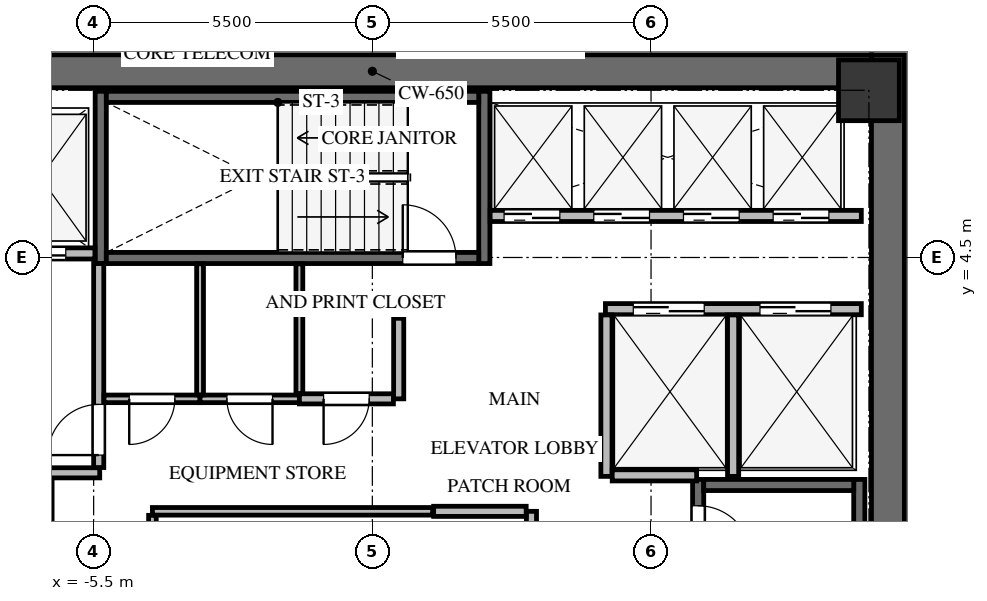
"""IFC4 building model, lengths in metres.
Left out: names, types, materials, properties, quantities, classifications, styles, units other than length and angle.
Written with IfcOpenShell. Run it as: python <this file> out.ifc"""

import sys

from ifc_helpers import new_model, si_unit, direction, frame, frame_2d, origin, origin_2d, place, context, subcontext, project, spatial, rectangle, extrude, source, transform, mapped, element, fill, save


model = new_model("IFC4")
c1 = context("Model", 3, precision=1e-05, world=origin(), true_north=direction((0.0, 1.0)))
c2 = subcontext(c1, "Body", "Model", "MODEL_VIEW")
j1 = project(units=[si_unit("LENGTHUNIT", "METRE"), si_unit("PLANEANGLEUNIT", "RADIAN")], contexts=[c1])
p1 = place(None, origin())
s1 = spatial("IfcSite", under=j1, at=p1, CompositionType="ELEMENT")
p2 = place(p1, origin())
s2 = spatial("IfcBuilding", under=s1, at=p2, CompositionType="ELEMENT")
p3 = place(p2, frame((0.0, 0.0, 177.1)))
s3 = spatial("IfcBuildingStorey", under=s2, at=p3, CompositionType="ELEMENT", Elevation=177.1)
p4 = place(p3, frame((10.175, -8.5, 0.0), z_axis=(0.0, 0.0, 1.0), x_axis=(0.0, 1.0, 0.0)))
e1 = element("IfcWall", 1, at=p4, inside=s3, PredefinedType="SHEAR", context=c2, shape_type="SweptSolid", body=[
    extrude(rectangle(XDim=17.0, YDim=0.65, at=frame_2d((8.5, 0.0))), origin(), (0.0, 0.0, 1.0), 3.3),
])
p5 = place(p3, frame((-9.85, 8.175, 0.0), z_axis=(0.0, 0.0, 1.0), x_axis=(1.0, 0.0, 0.0)))
e2 = element("IfcWall", 2, at=p5, inside=s3, PredefinedType="SHEAR", context=c2, shape_type="SweptSolid", body=[
    extrude(rectangle(XDim=19.7, YDim=0.65, at=frame_2d((9.85, 0.0))), origin(), (0.0, 0.0, 1.0), 3.3),
])
p6 = place(p3, frame((-6.43, -7.77, -0.24), z_axis=(0.0, 0.0, 1.0), x_axis=(0.0, 1.0, 0.0)))
e3 = element("IfcWall", 3, at=p6, inside=s3, PredefinedType="SHEAR", context=c2, shape_type="SweptSolid", body=[
    extrude(rectangle(XDim=7.89, YDim=0.22, at=frame_2d((3.945, 0.0))), origin(), (0.0, 0.0, 1.0), 3.3),
])
p7 = place(p6, frame((6.32, 0.0, 0.0)))
e4 = element("IfcOpeningElement", 4, at=p7, cuts=e3, PredefinedType="OPENING", context=c2, shape_type="SweptSolid", body=[
    extrude(rectangle(XDim=1.05, YDim=2.15, at=frame_2d((0.525, 1.075))), frame((0.0, 0.12, 0.0), z_axis=(0.0, -1.0, 0.0), x_axis=(1.0, 0.0, 0.0)), (0.0, 0.0, 1.0), 0.24),
])
p8 = place(p3, frame((9.61, -7.77, -0.24), z_axis=(0.0, 0.0, 1.0), x_axis=(0.0, 1.0, 0.0)))
e5 = element("IfcWall", 5, at=p8, inside=s3, PredefinedType="SHEAR", context=c2, shape_type="SweptSolid", body=[
    extrude(rectangle(XDim=7.89, YDim=0.22, at=frame_2d((3.945, 0.0))), origin(), (0.0, 0.0, 1.0), 3.3),
])
p9 = place(p3, frame((6.43, 0.12, -0.24), z_axis=(0.0, 0.0, 1.0), x_axis=(0.0, -1.0, 0.0)))
e6 = element("IfcWall", 6, at=p9, inside=s3, PredefinedType="SHEAR", context=c2, shape_type="SweptSolid", body=[
    extrude(rectangle(XDim=7.89, YDim=0.22, at=frame_2d((3.945, 0.0))), origin(), (0.0, 0.0, 1.0), 3.3),
])
p10 = place(p9, frame((0.52, 0.0, 0.0)))
e7 = element("IfcOpeningElement", 7, at=p10, cuts=e6, PredefinedType="OPENING", context=c2, shape_type="SweptSolid", body=[
    extrude(rectangle(XDim=1.05, YDim=2.15, at=frame_2d((0.525, 1.075))), frame((0.0, 0.12, 0.0), z_axis=(0.0, -1.0, 0.0), x_axis=(1.0, 0.0, 0.0)), (0.0, 0.0, 1.0), 0.24),
])
p11 = place(p3, frame((9.5, 0.01, -0.24), z_axis=(0.0, 0.0, 1.0), x_axis=(-1.0, 0.0, 0.0)))
e8 = element("IfcWall", 8, at=p11, inside=s3, PredefinedType="SHEAR", context=c2, shape_type="SweptSolid", body=[
    extrude(rectangle(XDim=2.96, YDim=0.22, at=frame_2d((1.48, 0.0))), origin(), (0.0, 0.0, 1.0), 3.3),
])
for number, where, z_axis, x_axis in (
    (9, (2.21, 4.38, -0.24), (0.0, 0.0, 1.0), (0.0, 1.0, 0.0)),
    (10, (-5.36, 7.78, -0.24), (0.0, 0.0, 1.0), (0.0, -1.0, 0.0)),
):
    element("IfcWall", number, at=place(p3, frame(where, z_axis=z_axis, x_axis=x_axis)), inside=s3, PredefinedType="SHEAR", context=c2, shape_type="SweptSolid", body=[
        extrude(rectangle(XDim=3.4, YDim=0.22, at=frame_2d((1.7, 0.0))), origin(), (0.0, 0.0, 1.0), 3.3),
    ])
p12 = place(p3, frame((-5.25, 4.49, -0.24), z_axis=(0.0, 0.0, 1.0), x_axis=(1.0, 0.0, 0.0)))
e11 = element("IfcWall", 11, at=p12, inside=s3, PredefinedType="SHEAR", context=c2, shape_type="SweptSolid", body=[
    extrude(rectangle(XDim=7.35, YDim=0.22, at=frame_2d((3.675, 0.0))), origin(), (0.0, 0.0, 1.0), 3.3),
])
p13 = place(p12, frame((5.85, 0.0, 0.0)))
e12 = element("IfcOpeningElement", 12, at=p13, cuts=e11, PredefinedType="OPENING", context=c2, shape_type="SweptSolid", body=[
    extrude(rectangle(XDim=1.05, YDim=2.15, at=frame_2d((0.525, 1.075))), frame((0.0, 0.12, 0.0), z_axis=(0.0, -1.0, 0.0), x_axis=(1.0, 0.0, 0.0)), (0.0, 0.0, 1.0), 0.24),
])
p14 = place(p3, frame((2.1, 7.67, -0.24), z_axis=(0.0, 0.0, 1.0), x_axis=(-1.0, 0.0, 0.0)))
e13 = element("IfcWall", 13, at=p14, inside=s3, PredefinedType="SHEAR", context=c2, shape_type="SweptSolid", body=[
    extrude(rectangle(XDim=7.35, YDim=0.22, at=frame_2d((3.675, 0.0))), origin(), (0.0, 0.0, 1.0), 3.3),
])
m1 = source(origin(), c2, "Body", "SweptSolid", [
    extrude(rectangle(XDim=1.2, YDim=1.2, at=origin_2d()), origin(), (0.0, 0.0, 1.0), 3.3),
])
p15 = place(p3, frame((9.8, 7.8, -0.24), z_axis=(0.0, 0.0, 1.0), x_axis=(1.0, 0.0, 0.0)))
e14 = element("IfcColumn", 14, at=p15, inside=s3, PredefinedType="COLUMN", context=c2, shape_type="MappedRepresentation", body=[
    mapped(m1, transform((0.0, 0.0, 0.0), x_axis=(1.0, 0.0, 0.0), y_axis=(0.0, 1.0, 0.0), z_axis=(0.0, 0.0, 1.0), scale=1.0)),
])
p16 = place(p3, frame((-9.65, 4.58, 0.0), z_axis=(0.0, 0.0, 1.0), x_axis=(1.0, 0.0, 0.0)))
e15 = element("IfcWall", 15, at=p16, inside=s3, PredefinedType="SOLIDWALL", context=c2, shape_type="SweptSolid", body=[
    extrude(rectangle(XDim=4.175, YDim=0.22, at=frame_2d((2.087, 0.0))), origin(), (0.0, 0.0, 1.0), 3.045),
])
p17 = place(p16, frame((0.4, 0.0, 0.0)))
e16 = element("IfcOpeningElement", 16, at=p17, cuts=e15, PredefinedType="OPENING", context=c2, shape_type="SweptSolid", body=[
    extrude(rectangle(XDim=1.2, YDim=2.15, at=frame_2d((0.6, 1.075))), frame((0.0, 0.12, 0.0), z_axis=(0.0, -1.0, 0.0), x_axis=(1.0, 0.0, 0.0)), (0.0, 0.0, 1.0), 0.24),
])
p18 = place(p16, frame((2.4, 0.0, 0.0)))
e17 = element("IfcOpeningElement", 17, at=p18, cuts=e15, PredefinedType="OPENING", context=c2, shape_type="SweptSolid", body=[
    extrude(rectangle(XDim=1.2, YDim=2.15, at=frame_2d((0.6, 1.075))), frame((0.0, 0.12, 0.0), z_axis=(0.0, -1.0, 0.0), x_axis=(1.0, 0.0, 0.0)), (0.0, 0.0, 1.0), 0.24),
])
p19 = place(p3, frame((-9.65, 0.25, 0.0), z_axis=(0.0, 0.0, 1.0), x_axis=(1.0, 0.0, 0.0)))
e18 = element("IfcWall", 18, at=p19, inside=s3, PredefinedType="SOLIDWALL", context=c2, shape_type="SweptSolid", body=[
    extrude(rectangle(XDim=4.27, YDim=0.2, at=frame_2d((2.135, 0.0))), origin(), (0.0, 0.0, 1.0), 3.045),
])
p20 = place(p3, frame((-5.4, 0.354, 0.0), z_axis=(0.0, 0.0, 1.0), x_axis=(0.0, 1.0, 0.0)))
e19 = element("IfcWall", 19, at=p20, inside=s3, PredefinedType="SOLIDWALL", context=c2, shape_type="SweptSolid", body=[
    extrude(rectangle(XDim=4.026, YDim=0.2, at=frame_2d((2.013, 0.0))), origin(), (0.0, 0.0, 1.0), 3.045),
])
p21 = place(p20, frame((0.246, 0.0, 0.0)))
e20 = element("IfcOpeningElement", 20, at=p21, cuts=e19, PredefinedType="OPENING", context=c2, shape_type="SweptSolid", body=[
    extrude(rectangle(XDim=1.0, YDim=2.15, at=frame_2d((0.5, 1.075))), frame((0.0, 0.11, 0.0), z_axis=(0.0, -1.0, 0.0), x_axis=(1.0, 0.0, 0.0)), (0.0, 0.0, 1.0), 0.22),
])
p22 = place(p3, frame((4.6, 3.48, 0.0), z_axis=(0.0, 0.0, 1.0), x_axis=(1.0, 0.0, 0.0)))
e21 = element("IfcWall", 21, at=p22, inside=s3, PredefinedType="SOLIDWALL", context=c2, shape_type="SweptSolid", body=[
    extrude(rectangle(XDim=5.05, YDim=0.22, at=frame_2d((2.525, 0.0))), origin(), (0.0, 0.0, 1.0), 3.045),
])
p23 = place(p22, frame((0.55, 0.0, 0.0)))
e22 = element("IfcOpeningElement", 22, at=p23, cuts=e21, PredefinedType="OPENING", context=c2, shape_type="SweptSolid", body=[
    extrude(rectangle(XDim=1.4, YDim=2.15, at=frame_2d((0.7, 1.075))), frame((0.0, 0.12, 0.0), z_axis=(0.0, -1.0, 0.0), x_axis=(1.0, 0.0, 0.0)), (0.0, 0.0, 1.0), 0.24),
])
p24 = place(p22, frame((3.05, 0.0, 0.0)))
e23 = element("IfcOpeningElement", 23, at=p24, cuts=e21, PredefinedType="OPENING", context=c2, shape_type="SweptSolid", body=[
    extrude(rectangle(XDim=1.4, YDim=2.15, at=frame_2d((0.7, 1.075))), frame((0.0, 0.12, 0.0), z_axis=(0.0, -1.0, 0.0), x_axis=(1.0, 0.0, 0.0)), (0.0, 0.0, 1.0), 0.24),
])
for number, where, z_axis, x_axis in (
    (24, (4.62, 0.18, 0.0), (0.0, 0.0, 1.0), (0.0, 1.0, 0.0)),
    (25, (7.12, 0.18, 0.0), (0.0, 0.0, 1.0), (0.0, 1.0, 0.0)),
):
    element("IfcWall", number, at=place(p3, frame(where, z_axis=z_axis, x_axis=x_axis)), inside=s3, PredefinedType="SOLIDWALL", context=c2, shape_type="SweptSolid", body=[
        extrude(rectangle(XDim=3.186, YDim=0.22, at=frame_2d((1.593, 0.0))), origin(), (0.0, 0.0, 1.0), 3.045),
    ])
p25 = place(p3, frame((4.734, 0.2, 0.0), z_axis=(0.0, 0.0, 1.0), x_axis=(1.0, 0.0, 0.0)))
e26 = element("IfcWall", 26, at=p25, inside=s3, PredefinedType="SOLIDWALL", context=c2, shape_type="SweptSolid", body=[
    extrude(rectangle(XDim=1.666, YDim=0.22, at=frame_2d((0.833, 0.0))), origin(), (0.0, 0.0, 1.0), 3.045),
])
p26 = place(p3, frame((2.325, 5.32, 0.0), z_axis=(0.0, 0.0, 1.0), x_axis=(1.0, 0.0, 0.0)))
e27 = element("IfcWall", 27, at=p26, inside=s3, PredefinedType="SOLIDWALL", context=c2, shape_type="SweptSolid", body=[
    extrude(rectangle(XDim=7.325, YDim=0.22, at=frame_2d((3.663, 0.0))), origin(), (0.0, 0.0, 1.0), 3.045),
])
p27 = place(p26, frame((0.275, 0.0, 0.0)))
e28 = element("IfcOpeningElement", 28, at=p27, cuts=e27, PredefinedType="OPENING", context=c2, shape_type="SweptSolid", body=[
    extrude(rectangle(XDim=1.1, YDim=2.15, at=frame_2d((0.55, 1.075))), frame((0.0, 0.12, 0.0), z_axis=(0.0, -1.0, 0.0), x_axis=(1.0, 0.0, 0.0)), (0.0, 0.0, 1.0), 0.24),
])
p28 = place(p26, frame((2.045, 0.0, 0.0)))
e29 = element("IfcOpeningElement", 29, at=p28, cuts=e27, PredefinedType="OPENING", context=c2, shape_type="SweptSolid", body=[
    extrude(rectangle(XDim=1.1, YDim=2.15, at=frame_2d((0.55, 1.075))), frame((0.0, 0.12, 0.0), z_axis=(0.0, -1.0, 0.0), x_axis=(1.0, 0.0, 0.0)), (0.0, 0.0, 1.0), 0.24),
])
p29 = place(p26, frame((3.815, 0.0, 0.0)))
e30 = element("IfcOpeningElement", 30, at=p29, cuts=e27, PredefinedType="OPENING", context=c2, shape_type="SweptSolid", body=[
    extrude(rectangle(XDim=1.1, YDim=2.15, at=frame_2d((0.55, 1.075))), frame((0.0, 0.12, 0.0), z_axis=(0.0, -1.0, 0.0), x_axis=(1.0, 0.0, 0.0)), (0.0, 0.0, 1.0), 0.24),
])
p30 = place(p26, frame((5.585, 0.0, 0.0)))
e31 = element("IfcOpeningElement", 31, at=p30, cuts=e27, PredefinedType="OPENING", context=c2, shape_type="SweptSolid", body=[
    extrude(rectangle(XDim=1.1, YDim=2.15, at=frame_2d((0.55, 1.075))), frame((0.0, 0.12, 0.0), z_axis=(0.0, -1.0, 0.0), x_axis=(1.0, 0.0, 0.0)), (0.0, 0.0, 1.0), 0.24),
])
p31 = place(p3, frame((-4.34, -0.51, 0.0), z_axis=(0.0, 0.0, 1.0), x_axis=(1.0, 0.0, 0.0)))
e32 = element("IfcWall", 32, at=p31, inside=s3, PredefinedType="PARTITIONING", context=c2, shape_type="SweptSolid", body=[
    extrude(rectangle(XDim=5.53, YDim=0.15, at=frame_2d((2.765, 0.0))), origin(), (0.0, 0.0, 1.0), 3.045),
])
p32 = place(p3, frame((-4.34, -2.961, 0.0), z_axis=(0.0, 0.0, 1.0), x_axis=(0.0, 1.0, 0.0)))
e33 = element("IfcWall", 33, at=p32, inside=s3, PredefinedType="PARTITIONING", context=c2, shape_type="SweptSolid", body=[
    extrude(rectangle(XDim=2.372, YDim=0.15, at=frame_2d((1.186, 0.0))), origin(), (0.0, 0.0, 1.0), 3.045),
])
p33 = place(p3, frame((3.14, -0.51, 0.0), z_axis=(0.0, 0.0, 1.0), x_axis=(0.0, -1.0, 0.0)))
e34 = element("IfcWall", 34, at=p33, inside=s3, PredefinedType="SOLIDWALL", context=c2, shape_type="SweptSolid", body=[
    extrude(rectangle(XDim=2.53, YDim=0.2, at=frame_2d((1.265, 0.0))), origin(), (0.0, 0.0, 1.0), 3.045),
])
p34 = place(p33, frame((0.815, 0.0, 0.0)))
e35 = element("IfcOpeningElement", 35, at=p34, cuts=e34, PredefinedType="OPENING", context=c2, shape_type="SweptSolid", body=[
    extrude(rectangle(XDim=0.9, YDim=2.05, at=frame_2d((0.45, 1.025))), frame((0.0, 0.11, 0.0), z_axis=(0.0, -1.0, 0.0), x_axis=(1.0, 0.0, 0.0)), (0.0, 0.0, 1.0), 0.22),
])
p35 = place(p3, frame((1.21, -0.51, 0.0), z_axis=(0.0, 0.0, 1.0), x_axis=(1.0, 0.0, 0.0)))
e36 = element("IfcWall", 36, at=p35, inside=s3, PredefinedType="SOLIDWALL", context=c2, shape_type="SweptSolid", body=[
    extrude(rectangle(XDim=1.826, YDim=0.2, at=frame_2d((0.913, 0.0))), origin(), (0.0, 0.0, 1.0), 3.045),
])
p36 = place(p3, frame((-3.4, 1.71, 0.0), z_axis=(0.0, 0.0, 1.0), x_axis=(-1.0, 0.0, 0.0)))
e37 = element("IfcWall", 37, at=p36, inside=s3, PredefinedType="PARTITIONING", context=c2, shape_type="SweptSolid", body=[
    extrude(rectangle(XDim=1.896, YDim=0.15, at=frame_2d((0.948, 0.0))), origin(), (0.0, 0.0, 1.0), 3.045),
])
p37 = place(p36, frame((0.498, 0.0, 0.0)))
e38 = element("IfcOpeningElement", 38, at=p37, cuts=e37, PredefinedType="OPENING", context=c2, shape_type="SweptSolid", body=[
    extrude(rectangle(XDim=0.9, YDim=2.05, at=frame_2d((0.45, 1.025))), frame((0.0, 0.085, 0.0), z_axis=(0.0, -1.0, 0.0), x_axis=(1.0, 0.0, 0.0)), (0.0, 0.0, 1.0), 0.17),
])
p38 = place(p3, frame((-1.44, 1.71, 0.0), z_axis=(0.0, 0.0, 1.0), x_axis=(-1.0, 0.0, 0.0)))
e39 = element("IfcWall", 39, at=p38, inside=s3, PredefinedType="PARTITIONING", context=c2, shape_type="SweptSolid", body=[
    extrude(rectangle(XDim=1.96, YDim=0.15, at=frame_2d((0.98, 0.0))), origin(), (0.0, 0.0, 1.0), 3.045),
])
p39 = place(p38, frame((0.53, 0.0, 0.0)))
e40 = element("IfcOpeningElement", 40, at=p39, cuts=e39, PredefinedType="OPENING", context=c2, shape_type="SweptSolid", body=[
    extrude(rectangle(XDim=0.9, YDim=2.05, at=frame_2d((0.45, 1.025))), frame((0.0, 0.085, 0.0), z_axis=(0.0, -1.0, 0.0), x_axis=(1.0, 0.0, 0.0)), (0.0, 0.0, 1.0), 0.17),
])
p40 = place(p3, frame((0.52, 3.3, 0.0), z_axis=(0.0, 0.0, 1.0), x_axis=(0.0, -1.0, 0.0)))
e41 = element("IfcWall", 41, at=p40, inside=s3, PredefinedType="SOLIDWALL", context=c2, shape_type="SweptSolid", body=[
    extrude(rectangle(XDim=1.59, YDim=0.2, at=frame_2d((0.795, 0.0))), origin(), (0.0, 0.0, 1.0), 3.045),
])
p41 = place(p3, frame((0.416, 1.71, 0.0), z_axis=(0.0, 0.0, 1.0), x_axis=(-1.0, 0.0, 0.0)))
e42 = element("IfcWall", 42, at=p41, inside=s3, PredefinedType="SOLIDWALL", context=c2, shape_type="SweptSolid", body=[
    extrude(rectangle(XDim=1.856, YDim=0.2, at=frame_2d((0.928, 0.0))), origin(), (0.0, 0.0, 1.0), 3.045),
])
p42 = place(p41, frame((0.478, 0.0, 0.0)))
e43 = element("IfcOpeningElement", 43, at=p42, cuts=e42, PredefinedType="OPENING", context=c2, shape_type="SweptSolid", body=[
    extrude(rectangle(XDim=0.9, YDim=2.05, at=frame_2d((0.45, 1.025))), frame((0.0, 0.11, 0.0), z_axis=(0.0, -1.0, 0.0), x_axis=(1.0, 0.0, 0.0)), (0.0, 0.0, 1.0), 0.22),
])
p43 = place(p3, frame((-3.4, 4.375, 0.0), z_axis=(0.0, 0.0, 1.0), x_axis=(0.0, -1.0, 0.0)))
e44 = element("IfcWall", 44, at=p43, inside=s3, PredefinedType="PARTITIONING", context=c2, shape_type="SweptSolid", body=[
    extrude(rectangle(XDim=2.586, YDim=0.135, at=frame_2d((1.293, 0.0))), origin(), (0.0, 0.0, 1.0), 3.045),
])
p44 = place(p3, frame((-1.44, 4.375, 0.0), z_axis=(0.0, 0.0, 1.0), x_axis=(0.0, -1.0, 0.0)))
e45 = element("IfcWall", 45, at=p44, inside=s3, PredefinedType="PARTITIONING", context=c2, shape_type="SweptSolid", body=[
    extrude(rectangle(XDim=2.561, YDim=0.135, at=frame_2d((1.281, 0.0))), origin(), (0.0, 0.0, 1.0), 3.045),
])
m2 = source(origin(), c2, "Body", "SweptSolid", [
    extrude(rectangle(XDim=1.05, YDim=2.15, at=frame_2d((0.525, 1.075))), frame((0.0, 0.025, 0.0), z_axis=(0.0, -1.0, 0.0), x_axis=(1.0, 0.0, 0.0)), (0.0, 0.0, 1.0), 0.05),
])
p45 = place(p10, origin())
e46 = element("IfcDoor", 46, at=p45, inside=s3, OperationType="SINGLE_SWING_RIGHT", PredefinedType="DOOR", context=c2, shape_type="MappedRepresentation", body=[
    mapped(m2, transform((0.0, 0.0, 0.0), x_axis=(1.0, 0.0, 0.0), y_axis=(0.0, 1.0, 0.0), z_axis=(0.0, 0.0, 1.0), scale=1.0)),
])
fill(e7, e46)
m3 = source(origin(), c2, "Body", "SweptSolid", [
    extrude(rectangle(XDim=1.05, YDim=2.15, at=frame_2d((0.525, 1.075))), frame((0.0, 0.025, 0.0), z_axis=(0.0, -1.0, 0.0), x_axis=(1.0, 0.0, 0.0)), (0.0, 0.0, 1.0), 0.05),
])
p46 = place(p13, origin())
e47 = element("IfcDoor", 47, at=p46, inside=s3, OperationType="SINGLE_SWING_LEFT", PredefinedType="DOOR", context=c2, shape_type="MappedRepresentation", body=[
    mapped(m3, transform((0.0, 0.0, 0.0), x_axis=(1.0, 0.0, 0.0), y_axis=(0.0, 1.0, 0.0), z_axis=(0.0, 0.0, 1.0), scale=1.0)),
])
fill(e12, e47)
m4 = source(origin(), c2, "Body", "SweptSolid", [
    extrude(rectangle(XDim=1.2, YDim=2.15, at=frame_2d((0.6, 1.075))), frame((0.0, 0.025, 0.0), z_axis=(0.0, -1.0, 0.0), x_axis=(1.0, 0.0, 0.0)), (0.0, 0.0, 1.0), 0.05),
])
p47 = place(p18, origin())
e48 = element("IfcDoor", 48, at=p47, inside=s3, OperationType="DOUBLE_DOOR_SLIDING", PredefinedType="DOOR", context=c2, shape_type="MappedRepresentation", body=[
    mapped(m4, transform((0.0, 0.0, 0.0), x_axis=(1.0, 0.0, 0.0), y_axis=(0.0, 1.0, 0.0), z_axis=(0.0, 0.0, 1.0), scale=1.0)),
])
fill(e17, e48)
m5 = source(origin(), c2, "Body", "SweptSolid", [
    extrude(rectangle(XDim=1.0, YDim=2.15, at=frame_2d((0.5, 1.075))), frame((0.0, 0.025, 0.0), z_axis=(0.0, -1.0, 0.0), x_axis=(1.0, 0.0, 0.0)), (0.0, 0.0, 1.0), 0.05),
])
p48 = place(p21, origin())
e49 = element("IfcDoor", 49, at=p48, inside=s3, OperationType="SINGLE_SWING_LEFT", PredefinedType="DOOR", context=c2, shape_type="MappedRepresentation", body=[
    mapped(m5, transform((0.0, 0.0, 0.0), x_axis=(1.0, 0.0, 0.0), y_axis=(0.0, 1.0, 0.0), z_axis=(0.0, 0.0, 1.0), scale=1.0)),
])
fill(e20, e49)
m6 = source(origin(), c2, "Body", "SweptSolid", [
    extrude(rectangle(XDim=1.4, YDim=2.15, at=frame_2d((0.7, 1.075))), frame((0.0, 0.025, 0.0), z_axis=(0.0, -1.0, 0.0), x_axis=(1.0, 0.0, 0.0)), (0.0, 0.0, 1.0), 0.05),
])
p49 = place(p23, origin())
e50 = element("IfcDoor", 50, at=p49, inside=s3, OperationType="DOUBLE_DOOR_SLIDING", PredefinedType="DOOR", context=c2, shape_type="MappedRepresentation", body=[
    mapped(m6, transform((0.0, 0.0, 0.0), x_axis=(1.0, 0.0, 0.0), y_axis=(0.0, 1.0, 0.0), z_axis=(0.0, 0.0, 1.0), scale=1.0)),
])
fill(e22, e50)
p50 = place(p24, origin())
e51 = element("IfcDoor", 51, at=p50, inside=s3, OperationType="DOUBLE_DOOR_SLIDING", PredefinedType="DOOR", context=c2, shape_type="MappedRepresentation", body=[
    mapped(m6, transform((0.0, 0.0, 0.0), x_axis=(1.0, 0.0, 0.0), y_axis=(0.0, 1.0, 0.0), z_axis=(0.0, 0.0, 1.0), scale=1.0)),
])
fill(e23, e51)
m7 = source(origin(), c2, "Body", "SweptSolid", [
    extrude(rectangle(XDim=1.1, YDim=2.15, at=frame_2d((0.55, 1.075))), frame((0.0, 0.025, 0.0), z_axis=(0.0, -1.0, 0.0), x_axis=(1.0, 0.0, 0.0)), (0.0, 0.0, 1.0), 0.05),
])
p51 = place(p27, origin())
e52 = element("IfcDoor", 52, at=p51, inside=s3, OperationType="DOUBLE_DOOR_SLIDING", PredefinedType="DOOR", context=c2, shape_type="MappedRepresentation", body=[
    mapped(m7, transform((0.0, 0.0, 0.0), x_axis=(1.0, 0.0, 0.0), y_axis=(0.0, 1.0, 0.0), z_axis=(0.0, 0.0, 1.0), scale=1.0)),
])
fill(e28, e52)
p52 = place(p28, origin())
e53 = element("IfcDoor", 53, at=p52, inside=s3, OperationType="DOUBLE_DOOR_SLIDING", PredefinedType="DOOR", context=c2, shape_type="MappedRepresentation", body=[
    mapped(m7, transform((0.0, 0.0, 0.0), x_axis=(1.0, 0.0, 0.0), y_axis=(0.0, 1.0, 0.0), z_axis=(0.0, 0.0, 1.0), scale=1.0)),
])
fill(e29, e53)
p53 = place(p29, origin())
e54 = element("IfcDoor", 54, at=p53, inside=s3, OperationType="DOUBLE_DOOR_SLIDING", PredefinedType="DOOR", context=c2, shape_type="MappedRepresentation", body=[
    mapped(m7, transform((0.0, 0.0, 0.0), x_axis=(1.0, 0.0, 0.0), y_axis=(0.0, 1.0, 0.0), z_axis=(0.0, 0.0, 1.0), scale=1.0)),
])
fill(e30, e54)
p54 = place(p30, origin())
e55 = element("IfcDoor", 55, at=p54, inside=s3, OperationType="DOUBLE_DOOR_SLIDING", PredefinedType="DOOR", context=c2, shape_type="MappedRepresentation", body=[
    mapped(m7, transform((0.0, 0.0, 0.0), x_axis=(1.0, 0.0, 0.0), y_axis=(0.0, 1.0, 0.0), z_axis=(0.0, 0.0, 1.0), scale=1.0)),
])
fill(e31, e55)
m8 = source(origin(), c2, "Body", "SweptSolid", [
    extrude(rectangle(XDim=0.9, YDim=2.05, at=frame_2d((0.45, 1.025))), frame((0.0, 0.025, 0.0), z_axis=(0.0, -1.0, 0.0), x_axis=(1.0, 0.0, 0.0)), (0.0, 0.0, 1.0), 0.05),
])
p55 = place(p37, origin())
e56 = element("IfcDoor", 56, at=p55, inside=s3, OperationType="SINGLE_SWING_RIGHT", PredefinedType="DOOR", context=c2, shape_type="MappedRepresentation", body=[
    mapped(m8, transform((0.0, 0.0, 0.0), x_axis=(1.0, 0.0, 0.0), y_axis=(0.0, 1.0, 0.0), z_axis=(0.0, 0.0, 1.0), scale=1.0)),
])
fill(e38, e56)
m9 = source(origin(), c2, "Body", "SweptSolid", [
    extrude(rectangle(XDim=0.9, YDim=2.05, at=frame_2d((0.45, 1.025))), frame((0.0, 0.025, 0.0), z_axis=(0.0, -1.0, 0.0), x_axis=(1.0, 0.0, 0.0)), (0.0, 0.0, 1.0), 0.05),
])
p56 = place(p39, origin())
e57 = element("IfcDoor", 57, at=p56, inside=s3, OperationType="SINGLE_SWING_LEFT", PredefinedType="DOOR", context=c2, shape_type="MappedRepresentation", body=[
    mapped(m9, transform((0.0, 0.0, 0.0), x_axis=(1.0, 0.0, 0.0), y_axis=(0.0, 1.0, 0.0), z_axis=(0.0, 0.0, 1.0), scale=1.0)),
])
fill(e40, e57)
p57 = place(p42, origin())
e58 = element("IfcDoor", 58, at=p57, inside=s3, OperationType="SINGLE_SWING_RIGHT", PredefinedType="DOOR", context=c2, shape_type="MappedRepresentation", body=[
    mapped(m8, transform((0.0, 0.0, 0.0), x_axis=(1.0, 0.0, 0.0), y_axis=(0.0, 1.0, 0.0), z_axis=(0.0, 0.0, 1.0), scale=1.0)),
])
fill(e43, e58)
save(model, sys.argv[1])
